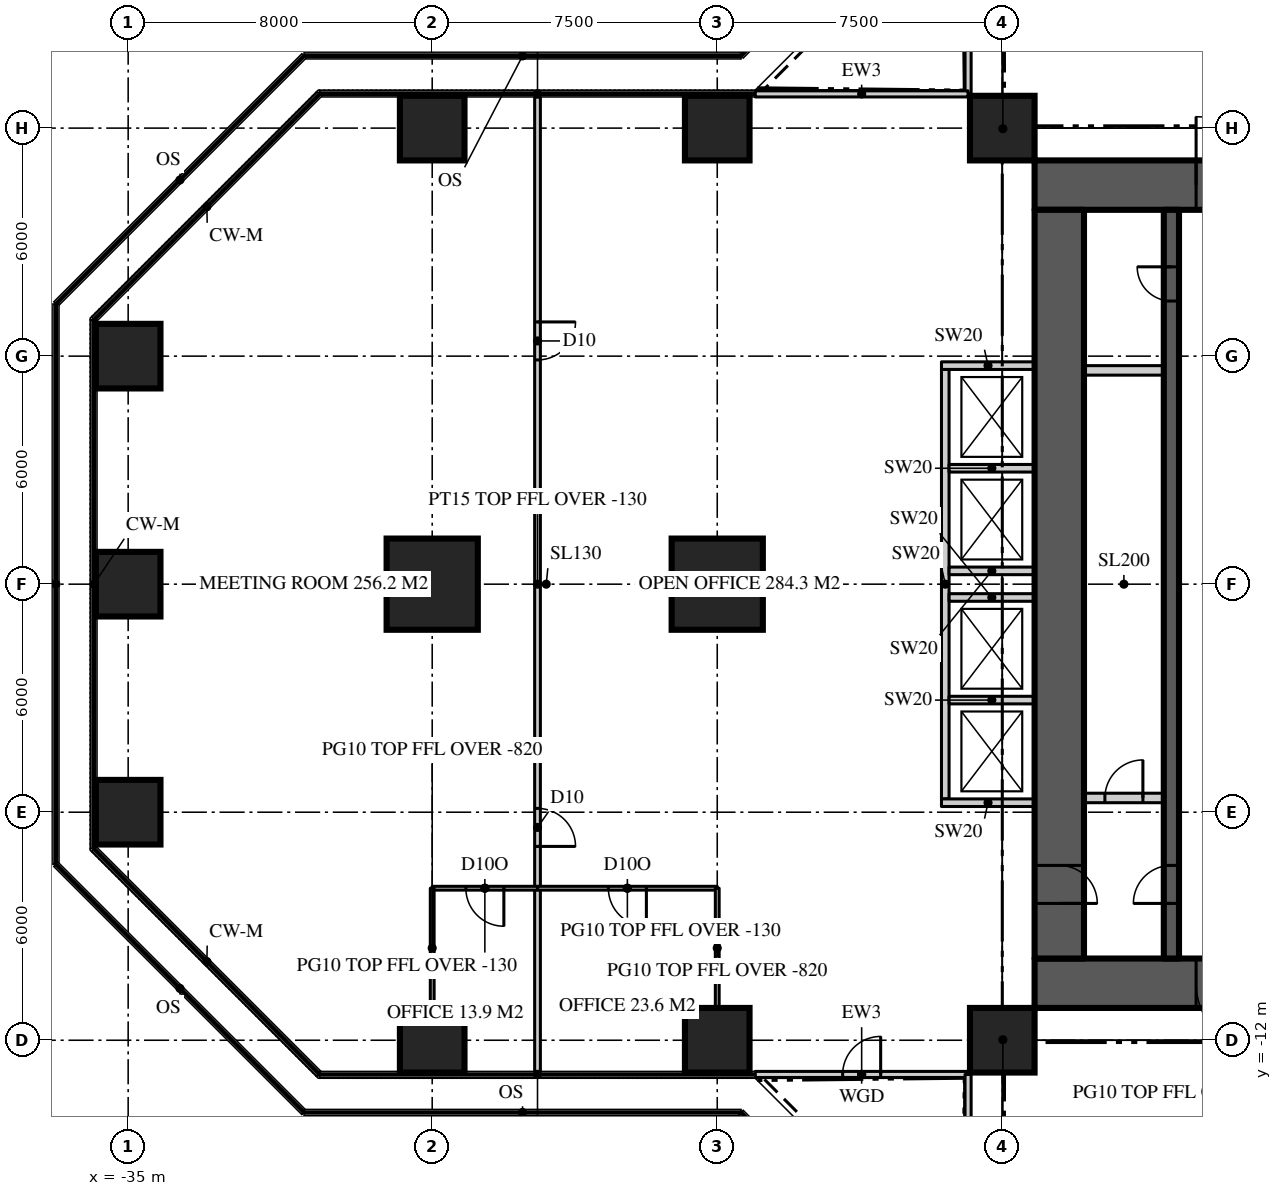
"""IFC4 building model, lengths in metres.
Left out: names, types, materials, properties, quantities, classifications, styles, units other than length and angle.
Written with IfcOpenShell. Run it as: python <this file> out.ifc"""

import sys

from ifc_helpers import new_model, si_unit, direction, frame, frame_2d, origin, origin_2d, place, context, subcontext, project, spatial, rectangle, extrude, element, fill, save


model = new_model("IFC4")
c1 = context("Model", 3, precision=1e-05, world=origin(), true_north=direction((0.0, 1.0)))
c2 = subcontext(c1, "Body", "Model", "MODEL_VIEW")
j1 = project(units=[si_unit("LENGTHUNIT", "METRE"), si_unit("PLANEANGLEUNIT", "RADIAN")], contexts=[c1])
p1 = place(None, origin())
s1 = spatial("IfcSite", under=j1, at=p1, CompositionType="ELEMENT")
p2 = place(p1, origin())
s2 = spatial("IfcBuilding", under=s1, at=p2, CompositionType="ELEMENT")
p3 = place(p2, frame((0.0, 0.0, 190.5)))
s3 = spatial("IfcBuildingStorey", under=s2, at=p3, CompositionType="ELEMENT", Elevation=190.5)
p4 = place(p3, frame((-11.15, 10.5, 0.0), z_axis=(0.0, 0.0, 1.0), x_axis=(1.0, 0.0, 0.0)))
e1 = element("IfcWall", 1, at=p4, inside=s3, PredefinedType="SHEAR", context=c2, shape_type="SweptSolid", body=[
    extrude(rectangle(XDim=22.3, YDim=1.3, at=frame_2d((11.15, 0.0))), origin(), (0.0, 0.0, 1.0), 3.9),
])
p5 = place(p4, frame((4.25, 0.0, 0.0)))
e2 = element("IfcOpeningElement", 2, at=p5, cuts=e1, PredefinedType="OPENING", context=c2, shape_type="SweptSolid", body=[
    extrude(rectangle(XDim=1.8, YDim=2.2, at=frame_2d((0.9, 1.1))), frame((0.0, 0.66, 0.0), z_axis=(0.0, -1.0, 0.0), x_axis=(1.0, 0.0, 0.0)), (0.0, 0.0, 1.0), 1.32),
])
p6 = place(p4, frame((16.25, 0.0, 0.0)))
e3 = element("IfcOpeningElement", 3, at=p6, cuts=e1, PredefinedType="OPENING", context=c2, shape_type="SweptSolid", body=[
    extrude(rectangle(XDim=1.8, YDim=2.2, at=frame_2d((0.9, 1.1))), frame((0.0, 0.66, 0.0), z_axis=(0.0, -1.0, 0.0), x_axis=(1.0, 0.0, 0.0)), (0.0, 0.0, 1.0), 1.32),
])
p7 = place(p3, frame((11.15, -10.5, 0.0), z_axis=(0.0, 0.0, 1.0), x_axis=(-1.0, 0.0, 0.0)))
e4 = element("IfcWall", 4, at=p7, inside=s3, PredefinedType="SHEAR", context=c2, shape_type="SweptSolid", body=[
    extrude(rectangle(XDim=22.3, YDim=1.3, at=frame_2d((11.15, 0.0))), origin(), (0.0, 0.0, 1.0), 3.9),
])
p8 = place(p7, frame((16.25, 0.0, 0.0)))
e5 = element("IfcOpeningElement", 5, at=p8, cuts=e4, PredefinedType="OPENING", context=c2, shape_type="SweptSolid", body=[
    extrude(rectangle(XDim=1.8, YDim=2.2, at=frame_2d((0.9, 1.1))), frame((0.0, 0.66, 0.0), z_axis=(0.0, -1.0, 0.0), x_axis=(1.0, 0.0, 0.0)), (0.0, 0.0, 1.0), 1.32),
])
p9 = place(p7, frame((4.25, 0.0, 0.0)))
e6 = element("IfcOpeningElement", 6, at=p9, cuts=e4, PredefinedType="OPENING", context=c2, shape_type="SweptSolid", body=[
    extrude(rectangle(XDim=1.8, YDim=2.2, at=frame_2d((0.9, 1.1))), frame((0.0, 0.66, 0.0), z_axis=(0.0, -1.0, 0.0), x_axis=(1.0, 0.0, 0.0)), (0.0, 0.0, 1.0), 1.32),
])
p10 = place(p3, frame((-10.5, 9.85, 0.0), z_axis=(0.0, 0.0, 1.0), x_axis=(0.0, -1.0, 0.0)))
e7 = element("IfcWall", 7, at=p10, inside=s3, PredefinedType="SHEAR", context=c2, shape_type="SweptSolid", body=[
    extrude(rectangle(XDim=19.7, YDim=1.3, at=frame_2d((9.85, 0.0))), origin(), (0.0, 0.0, 1.0), 3.9),
])
p11 = place(p10, frame((17.25, 0.0, 0.0)))
e8 = element("IfcOpeningElement", 8, at=p11, cuts=e7, PredefinedType="OPENING", context=c2, shape_type="SweptSolid", body=[
    extrude(rectangle(XDim=1.0, YDim=2.2, at=frame_2d((0.5, 1.1))), frame((0.0, 0.66, 0.0), z_axis=(0.0, -1.0, 0.0), x_axis=(1.0, 0.0, 0.0)), (0.0, 0.0, 1.0), 1.32),
])
for number, where, z_axis, x_axis in (
    (9, (-27.0, -12.0, 0.0), (0.0, 0.0, 1.0), (1.0, 0.0, 0.0)),
    (10, (-19.5, -12.0, 0.0), (0.0, 0.0, 1.0), (1.0, 0.0, 0.0)),
    (11, (-12.0, -12.0, 0.0), (0.0, 0.0, 1.0), (1.0, 0.0, 0.0)),
    (12, (-35.0, -6.0, 0.0), (0.0, 0.0, 1.0), (1.0, 0.0, 0.0)),
    (13, (-35.0, 0.0, 0.0), (0.0, 0.0, 1.0), (1.0, 0.0, 0.0)),
):
    element("IfcColumn", number, at=place(p3, frame(where, z_axis=z_axis, x_axis=x_axis)), inside=s3, PredefinedType="COLUMN", context=c2, shape_type="SweptSolid", body=[
        extrude(rectangle(XDim=1.7, YDim=1.7, at=origin_2d()), origin(), (0.0, 0.0, 1.0), 3.9),
    ])
for number, where, z_axis, x_axis in (
    (14, (-27.0, 0.0, 0.0), (0.0, 0.0, 1.0), (1.0, 0.0, 0.0)),
    (15, (-19.5, 0.0, 0.0), (0.0, 0.0, 1.0), (1.0, 0.0, 0.0)),
):
    element("IfcColumn", number, at=place(p3, frame(where, z_axis=z_axis, x_axis=x_axis)), inside=s3, PredefinedType="COLUMN", context=c2, shape_type="SweptSolid", body=[
        extrude(rectangle(XDim=2.4, YDim=2.4, at=origin_2d()), origin(), (0.0, 0.0, 1.0), 3.9),
    ])
for number, where, z_axis, x_axis in (
    (16, (-35.0, 6.0, 0.0), (0.0, 0.0, 1.0), (1.0, 0.0, 0.0)),
    (17, (-27.0, 12.0, 0.0), (0.0, 0.0, 1.0), (1.0, 0.0, 0.0)),
    (18, (-19.5, 12.0, 0.0), (0.0, 0.0, 1.0), (1.0, 0.0, 0.0)),
    (19, (-12.0, 12.0, 0.0), (0.0, 0.0, 1.0), (1.0, 0.0, 0.0)),
):
    element("IfcColumn", number, at=place(p3, frame(where, z_axis=z_axis, x_axis=x_axis)), inside=s3, PredefinedType="COLUMN", context=c2, shape_type="SweptSolid", body=[
        extrude(rectangle(XDim=1.7, YDim=1.7, at=origin_2d()), origin(), (0.0, 0.0, 1.0), 3.9),
    ])
p12 = place(p3, frame((-12.9, 18.5, 0.0), z_axis=(0.0, 0.0, 1.0), x_axis=(0.0, -1.0, 0.0)))
e20 = element("IfcWall", 20, at=p12, inside=s3, PredefinedType="SOLIDWALL", context=c2, shape_type="SweptSolid", body=[
    extrude(rectangle(XDim=5.6, YDim=0.16, at=frame_2d((2.8, 0.0))), origin(), (0.0, 0.0, 1.0), 3.77),
])
p13 = place(p12, frame((2.3, 0.0, 0.0)))
e21 = element("IfcOpeningElement", 21, at=p13, cuts=e20, PredefinedType="OPENING", context=c2, shape_type="SweptSolid", body=[
    extrude(rectangle(XDim=1.0, YDim=2.2, at=frame_2d((0.5, 1.1))), frame((0.0, 0.09, 0.0), z_axis=(0.0, -1.0, 0.0), x_axis=(1.0, 0.0, 0.0)), (0.0, 0.0, 1.0), 0.18),
])
p14 = place(p3, frame((-12.9, 12.9, 0.0), z_axis=(0.0, 0.0, 1.0), x_axis=(-1.0, 0.0, 0.0)))
e22 = element("IfcWall", 22, at=p14, inside=s3, PredefinedType="SOLIDWALL", context=c2, shape_type="SweptSolid", body=[
    extrude(rectangle(XDim=5.6, YDim=0.16, at=frame_2d((2.8, 0.0))), origin(), (0.0, 0.0, 1.0), 3.77),
])
p15 = place(p3, frame((-18.5, -12.9, 0.0), z_axis=(0.0, 0.0, 1.0), x_axis=(1.0, 0.0, 0.0)))
e23 = element("IfcWall", 23, at=p15, inside=s3, PredefinedType="SOLIDWALL", context=c2, shape_type="SweptSolid", body=[
    extrude(rectangle(XDim=5.6, YDim=0.16, at=frame_2d((2.8, 0.0))), origin(), (0.0, 0.0, 1.0), 3.77),
])
p16 = place(p15, frame((2.3, 0.0, 0.0)))
e24 = element("IfcOpeningElement", 24, at=p16, cuts=e23, PredefinedType="OPENING", context=c2, shape_type="SweptSolid", body=[
    extrude(rectangle(XDim=1.0, YDim=2.2, at=frame_2d((0.5, 1.1))), frame((0.0, 0.09, 0.0), z_axis=(0.0, -1.0, 0.0), x_axis=(1.0, 0.0, 0.0)), (0.0, 0.0, 1.0), 0.18),
])
p17 = place(p3, frame((-12.9, -12.9, 0.0), z_axis=(0.0, 0.0, 1.0), x_axis=(0.0, -1.0, 0.0)))
e25 = element("IfcWall", 25, at=p17, inside=s3, PredefinedType="SOLIDWALL", context=c2, shape_type="SweptSolid", body=[
    extrude(rectangle(XDim=5.6, YDim=0.16, at=frame_2d((2.8, 0.0))), origin(), (0.0, 0.0, 1.0), 3.77),
])
p18 = place(p3, frame((-7.55, -9.85, 0.0), z_axis=(0.0, 0.0, 1.0), x_axis=(0.0, 1.0, 0.0)))
e26 = element("IfcWall", 26, at=p18, inside=s3, PredefinedType="SHEAR", context=c2, shape_type="SweptSolid", body=[
    extrude(rectangle(XDim=19.7, YDim=0.4, at=frame_2d((9.85, 0.0))), origin(), (0.0, 0.0, 1.0), 3.9),
])
p19 = place(p18, frame((1.45, 0.0, 0.0)))
e27 = element("IfcOpeningElement", 27, at=p19, cuts=e26, PredefinedType="OPENING", context=c2, shape_type="SweptSolid", body=[
    extrude(rectangle(XDim=1.0, YDim=2.2, at=frame_2d((0.5, 1.1))), frame((0.0, 0.21, 0.0), z_axis=(0.0, -1.0, 0.0), x_axis=(1.0, 0.0, 0.0)), (0.0, 0.0, 1.0), 0.42),
])
p20 = place(p18, frame((17.3, 0.0, 0.0)))
e28 = element("IfcOpeningElement", 28, at=p20, cuts=e26, PredefinedType="OPENING", context=c2, shape_type="SweptSolid", body=[
    extrude(rectangle(XDim=0.9, YDim=2.1, at=frame_2d((0.45, 1.05))), frame((0.0, 0.21, 0.0), z_axis=(0.0, -1.0, 0.0), x_axis=(1.0, 0.0, 0.0)), (0.0, 0.0, 1.0), 0.42),
])
p21 = place(p3, frame((-9.85, 5.625, 0.0), z_axis=(0.0, 0.0, 1.0), x_axis=(1.0, 0.0, 0.0)))
e29 = element("IfcWall", 29, at=p21, inside=s3, PredefinedType="SOLIDWALL", context=c2, shape_type="SweptSolid", body=[
    extrude(rectangle(XDim=2.1, YDim=0.25, at=frame_2d((1.05, 0.0))), origin(), (0.0, 0.0, 1.0), 3.7),
])
p22 = place(p3, frame((-9.85, -5.625, 0.0), z_axis=(0.0, 0.0, 1.0), x_axis=(1.0, 0.0, 0.0)))
e30 = element("IfcWall", 30, at=p22, inside=s3, PredefinedType="SOLIDWALL", context=c2, shape_type="SweptSolid", body=[
    extrude(rectangle(XDim=2.1, YDim=0.25, at=frame_2d((1.05, 0.0))), origin(), (0.0, 0.0, 1.0), 3.7),
])
p23 = place(p22, frame((0.55, 0.0, 0.0)))
e31 = element("IfcOpeningElement", 31, at=p23, cuts=e30, PredefinedType="OPENING", context=c2, shape_type="SweptSolid", body=[
    extrude(rectangle(XDim=1.0, YDim=2.2, at=frame_2d((0.5, 1.1))), frame((0.0, 0.135, 0.0), z_axis=(0.0, -1.0, 0.0), x_axis=(1.0, 0.0, 0.0)), (0.0, 0.0, 1.0), 0.27),
])
p24 = place(p3, frame((-24.229, 12.82, 0.0), z_axis=(0.0, 0.0, 1.0), x_axis=(0.0, -1.0, 0.0)))
e32 = element("IfcWall", 32, at=p24, inside=s3, PredefinedType="PARTITIONING", context=c2, shape_type="SweptSolid", body=[
    extrude(rectangle(XDim=25.64, YDim=0.15, at=frame_2d((12.82, 0.0))), origin(), (0.0, 0.0, 1.0), 3.77),
])
p25 = place(p24, frame((18.72, 0.0, 0.0)))
e33 = element("IfcOpeningElement", 33, at=p25, cuts=e32, PredefinedType="OPENING", context=c2, shape_type="SweptSolid", body=[
    extrude(rectangle(XDim=1.0, YDim=2.2, at=frame_2d((0.5, 1.1))), frame((0.0, 0.085, 0.0), z_axis=(0.0, -1.0, 0.0), x_axis=(1.0, 0.0, 0.0)), (0.0, 0.0, 1.0), 0.17),
])
p26 = place(p24, frame((5.92, 0.0, 0.0)))
e34 = element("IfcOpeningElement", 34, at=p26, cuts=e32, PredefinedType="OPENING", context=c2, shape_type="SweptSolid", body=[
    extrude(rectangle(XDim=1.0, YDim=2.2, at=frame_2d((0.5, 1.1))), frame((0.0, 0.085, 0.0), z_axis=(0.0, -1.0, 0.0), x_axis=(1.0, 0.0, 0.0)), (0.0, 0.0, 1.0), 0.17),
])
p27 = place(p3, frame((-19.5, -8.0, 0.0), z_axis=(0.0, 0.0, 1.0), x_axis=(-1.0, 0.0, 0.0)))
e35 = element("IfcWall", 35, at=p27, inside=s3, PredefinedType="PARTITIONING", context=c2, shape_type="SweptSolid", body=[
    extrude(rectangle(XDim=4.729, YDim=0.1, at=frame_2d((2.365, 0.0))), origin(), (0.0, 0.0, 1.0), 3.77),
])
p28 = place(p27, frame((1.865, 0.0, 0.0)))
e36 = element("IfcOpeningElement", 36, at=p28, cuts=e35, PredefinedType="OPENING", context=c2, shape_type="SweptSolid", body=[
    extrude(rectangle(XDim=1.0, YDim=2.2, at=frame_2d((0.5, 1.1))), frame((0.0, 0.06, 0.0), z_axis=(0.0, -1.0, 0.0), x_axis=(1.0, 0.0, 0.0)), (0.0, 0.0, 1.0), 0.12),
])
p29 = place(p3, frame((-24.229, -8.0, 0.0), z_axis=(0.0, 0.0, 1.0), x_axis=(-1.0, 0.0, 0.0)))
e37 = element("IfcWall", 37, at=p29, inside=s3, PredefinedType="PARTITIONING", context=c2, shape_type="SweptSolid", body=[
    extrude(rectangle(XDim=2.771, YDim=0.1, at=frame_2d((1.385, 0.0))), origin(), (0.0, 0.0, 1.0), 3.77),
])
p30 = place(p29, frame((0.885, 0.0, 0.0)))
e38 = element("IfcOpeningElement", 38, at=p30, cuts=e37, PredefinedType="OPENING", context=c2, shape_type="SweptSolid", body=[
    extrude(rectangle(XDim=1.0, YDim=2.2, at=frame_2d((0.5, 1.1))), frame((0.0, 0.06, 0.0), z_axis=(0.0, -1.0, 0.0), x_axis=(1.0, 0.0, 0.0)), (0.0, 0.0, 1.0), 0.12),
])
for number, where, z_axis, x_axis in (
    (39, (-19.5, -8.0, 0.0), (0.0, 0.0, 1.0), (0.0, -1.0, 0.0)),
    (40, (-27.0, -8.0, 0.0), (0.0, 0.0, 1.0), (0.0, -1.0, 0.0)),
):
    element("IfcWall", number, at=place(p3, frame(where, z_axis=z_axis, x_axis=x_axis)), inside=s3, PredefinedType="PARTITIONING", context=c2, shape_type="SweptSolid", body=[
        extrude(rectangle(XDim=3.15, YDim=0.1, at=frame_2d((1.575, 0.0))), origin(), (0.0, 0.0, 1.0), 3.08),
    ])
p31 = place(p3, frame((-13.5, 5.65, 0.0), z_axis=(0.0, 0.0, 1.0), x_axis=(0.0, -1.0, 0.0)))
e41 = element("IfcWall", 41, at=p31, inside=s3, PredefinedType="SOLIDWALL", context=c2, shape_type="SweptSolid", body=[
    extrude(rectangle(XDim=11.3, YDim=0.2, at=frame_2d((5.65, 0.0))), origin(), (0.0, 0.0, 1.0), 3.7),
])
for number, where, z_axis, x_axis in (
    (42, (-11.15, 5.75, 0.0), (0.0, 0.0, 1.0), (-1.0, 0.0, 0.0)),
    (43, (-11.15, -5.75, 0.0), (0.0, 0.0, 1.0), (-1.0, 0.0, 0.0)),
):
    element("IfcWall", number, at=place(p3, frame(where, z_axis=z_axis, x_axis=x_axis)), inside=s3, PredefinedType="SOLIDWALL", context=c2, shape_type="SweptSolid", body=[
        extrude(rectangle(XDim=2.45, YDim=0.2, at=frame_2d((1.225, 0.0))), origin(), (0.0, 0.0, 1.0), 3.7),
    ])
for number, where, z_axis, x_axis in (
    (44, (-11.15, 3.05, 0.0), (0.0, 0.0, 1.0), (-1.0, 0.0, 0.0)),
    (45, (-11.15, 0.35, 0.0), (0.0, 0.0, 1.0), (-1.0, 0.0, 0.0)),
    (46, (-11.15, -0.35, 0.0), (0.0, 0.0, 1.0), (-1.0, 0.0, 0.0)),
    (47, (-11.15, -3.05, 0.0), (0.0, 0.0, 1.0), (-1.0, 0.0, 0.0)),
):
    element("IfcWall", number, at=place(p3, frame(where, z_axis=z_axis, x_axis=x_axis)), inside=s3, PredefinedType="SOLIDWALL", context=c2, shape_type="SweptSolid", body=[
        extrude(rectangle(XDim=2.25, YDim=0.2, at=frame_2d((1.125, 0.0))), origin(), (0.0, 0.0, 1.0), 3.7),
    ])
for number, where, z_axis, x_axis in (
    (48, (-11.15, 11.15, 0.0), (0.0, 0.0, 1.0), (-0.707, 0.707, 0.0)),
    (49, (-11.15, -11.15, 0.0), (0.0, 0.0, 1.0), (-0.707, -0.707, 0.0)),
):
    element("IfcWall", number, at=place(p3, frame(where, z_axis=z_axis, x_axis=x_axis)), inside=s3, PredefinedType="PARTITIONING", context=c2, shape_type="SweptSolid", body=[
        extrude(rectangle(XDim=2.362, YDim=0.15, at=frame_2d((1.181, 0.0))), origin(), (0.0, 0.0, 1.0), 3.77),
    ])
p32 = place(p16, origin())
e50 = element("IfcDoor", 50, at=p32, inside=s3, OperationType="SINGLE_SWING_RIGHT", PredefinedType="DOOR", context=c2, shape_type="SweptSolid", body=[
    extrude(rectangle(XDim=1.0, YDim=2.2, at=frame_2d((0.5, 1.1))), frame((0.0, 0.025, 0.0), z_axis=(0.0, -1.0, 0.0), x_axis=(1.0, 0.0, 0.0)), (0.0, 0.0, 1.0), 0.05),
])
fill(e24, e50)
p33 = place(p5, origin())
e51 = element("IfcDoor", 51, at=p33, inside=s3, OperationType="DOUBLE_DOOR_DOUBLE_SWING", PredefinedType="DOOR", context=c2, shape_type="SweptSolid", body=[
    extrude(rectangle(XDim=1.8, YDim=2.2, at=frame_2d((0.9, 1.1))), frame((0.0, 0.025, 0.0), z_axis=(0.0, -1.0, 0.0), x_axis=(1.0, 0.0, 0.0)), (0.0, 0.0, 1.0), 0.05),
])
fill(e2, e51)
p34 = place(p8, origin())
e52 = element("IfcDoor", 52, at=p34, inside=s3, OperationType="DOUBLE_DOOR_DOUBLE_SWING", PredefinedType="DOOR", context=c2, shape_type="SweptSolid", body=[
    extrude(rectangle(XDim=1.8, YDim=2.2, at=frame_2d((0.9, 1.1))), frame((0.0, 0.025, 0.0), z_axis=(0.0, -1.0, 0.0), x_axis=(1.0, 0.0, 0.0)), (0.0, 0.0, 1.0), 0.05),
])
fill(e5, e52)
p35 = place(p19, origin())
e53 = element("IfcDoor", 53, at=p35, inside=s3, OperationType="SINGLE_SWING_LEFT", PredefinedType="DOOR", context=c2, shape_type="SweptSolid", body=[
    extrude(rectangle(XDim=1.0, YDim=2.2, at=frame_2d((0.5, 1.1))), frame((0.0, 0.025, 0.0), z_axis=(0.0, -1.0, 0.0), x_axis=(1.0, 0.0, 0.0)), (0.0, 0.0, 1.0), 0.05),
])
fill(e27, e53)
p36 = place(p11, origin())
e54 = element("IfcDoor", 54, at=p36, inside=s3, OperationType="SINGLE_SWING_RIGHT", PredefinedType="DOOR", context=c2, shape_type="SweptSolid", body=[
    extrude(rectangle(XDim=1.0, YDim=2.2, at=frame_2d((0.5, 1.1))), frame((0.0, 0.025, 0.0), z_axis=(0.0, -1.0, 0.0), x_axis=(1.0, 0.0, 0.0)), (0.0, 0.0, 1.0), 0.05),
])
fill(e8, e54)
p37 = place(p20, origin())
e55 = element("IfcDoor", 55, at=p37, inside=s3, OperationType="SINGLE_SWING_RIGHT", PredefinedType="DOOR", context=c2, shape_type="SweptSolid", body=[
    extrude(rectangle(XDim=0.9, YDim=2.1, at=frame_2d((0.45, 1.05))), frame((0.0, 0.025, 0.0), z_axis=(0.0, -1.0, 0.0), x_axis=(1.0, 0.0, 0.0)), (0.0, 0.0, 1.0), 0.05),
])
fill(e28, e55)
p38 = place(p25, origin())
e56 = element("IfcDoor", 56, at=p38, inside=s3, OperationType="SINGLE_SWING_RIGHT", PredefinedType="DOOR", context=c2, shape_type="SweptSolid", body=[
    extrude(rectangle(XDim=1.0, YDim=2.2, at=frame_2d((0.5, 1.1))), frame((0.0, 0.025, 0.0), z_axis=(0.0, -1.0, 0.0), x_axis=(1.0, 0.0, 0.0)), (0.0, 0.0, 1.0), 0.05),
])
fill(e33, e56)
p39 = place(p26, origin())
e57 = element("IfcDoor", 57, at=p39, inside=s3, OperationType="SINGLE_SWING_LEFT", PredefinedType="DOOR", context=c2, shape_type="SweptSolid", body=[
    extrude(rectangle(XDim=1.0, YDim=2.2, at=frame_2d((0.5, 1.1))), frame((0.0, 0.025, 0.0), z_axis=(0.0, -1.0, 0.0), x_axis=(1.0, 0.0, 0.0)), (0.0, 0.0, 1.0), 0.05),
])
fill(e34, e57)
p40 = place(p28, origin())
e58 = element("IfcDoor", 58, at=p40, inside=s3, OperationType="SINGLE_SWING_LEFT", PredefinedType="DOOR", context=c2, shape_type="SweptSolid", body=[
    extrude(rectangle(XDim=1.0, YDim=2.2, at=frame_2d((0.5, 1.1))), frame((0.0, 0.025, 0.0), z_axis=(0.0, -1.0, 0.0), x_axis=(1.0, 0.0, 0.0)), (0.0, 0.0, 1.0), 0.05),
])
fill(e36, e58)
p41 = place(p30, origin())
e59 = element("IfcDoor", 59, at=p41, inside=s3, OperationType="SINGLE_SWING_LEFT", PredefinedType="DOOR", context=c2, shape_type="SweptSolid", body=[
    extrude(rectangle(XDim=1.0, YDim=2.2, at=frame_2d((0.5, 1.1))), frame((0.0, 0.025, 0.0), z_axis=(0.0, -1.0, 0.0), x_axis=(1.0, 0.0, 0.0)), (0.0, 0.0, 1.0), 0.05),
])
fill(e38, e59)
p42 = place(p23, origin())
e60 = element("IfcDoor", 60, at=p42, inside=s3, OperationType="SINGLE_SWING_RIGHT", PredefinedType="DOOR", context=c2, shape_type="SweptSolid", body=[
    extrude(rectangle(XDim=1.0, YDim=2.2, at=frame_2d((0.5, 1.1))), frame((0.0, 0.025, 0.0), z_axis=(0.0, -1.0, 0.0), x_axis=(1.0, 0.0, 0.0)), (0.0, 0.0, 1.0), 0.05),
])
fill(e31, e60)
save(model, sys.argv[1])
